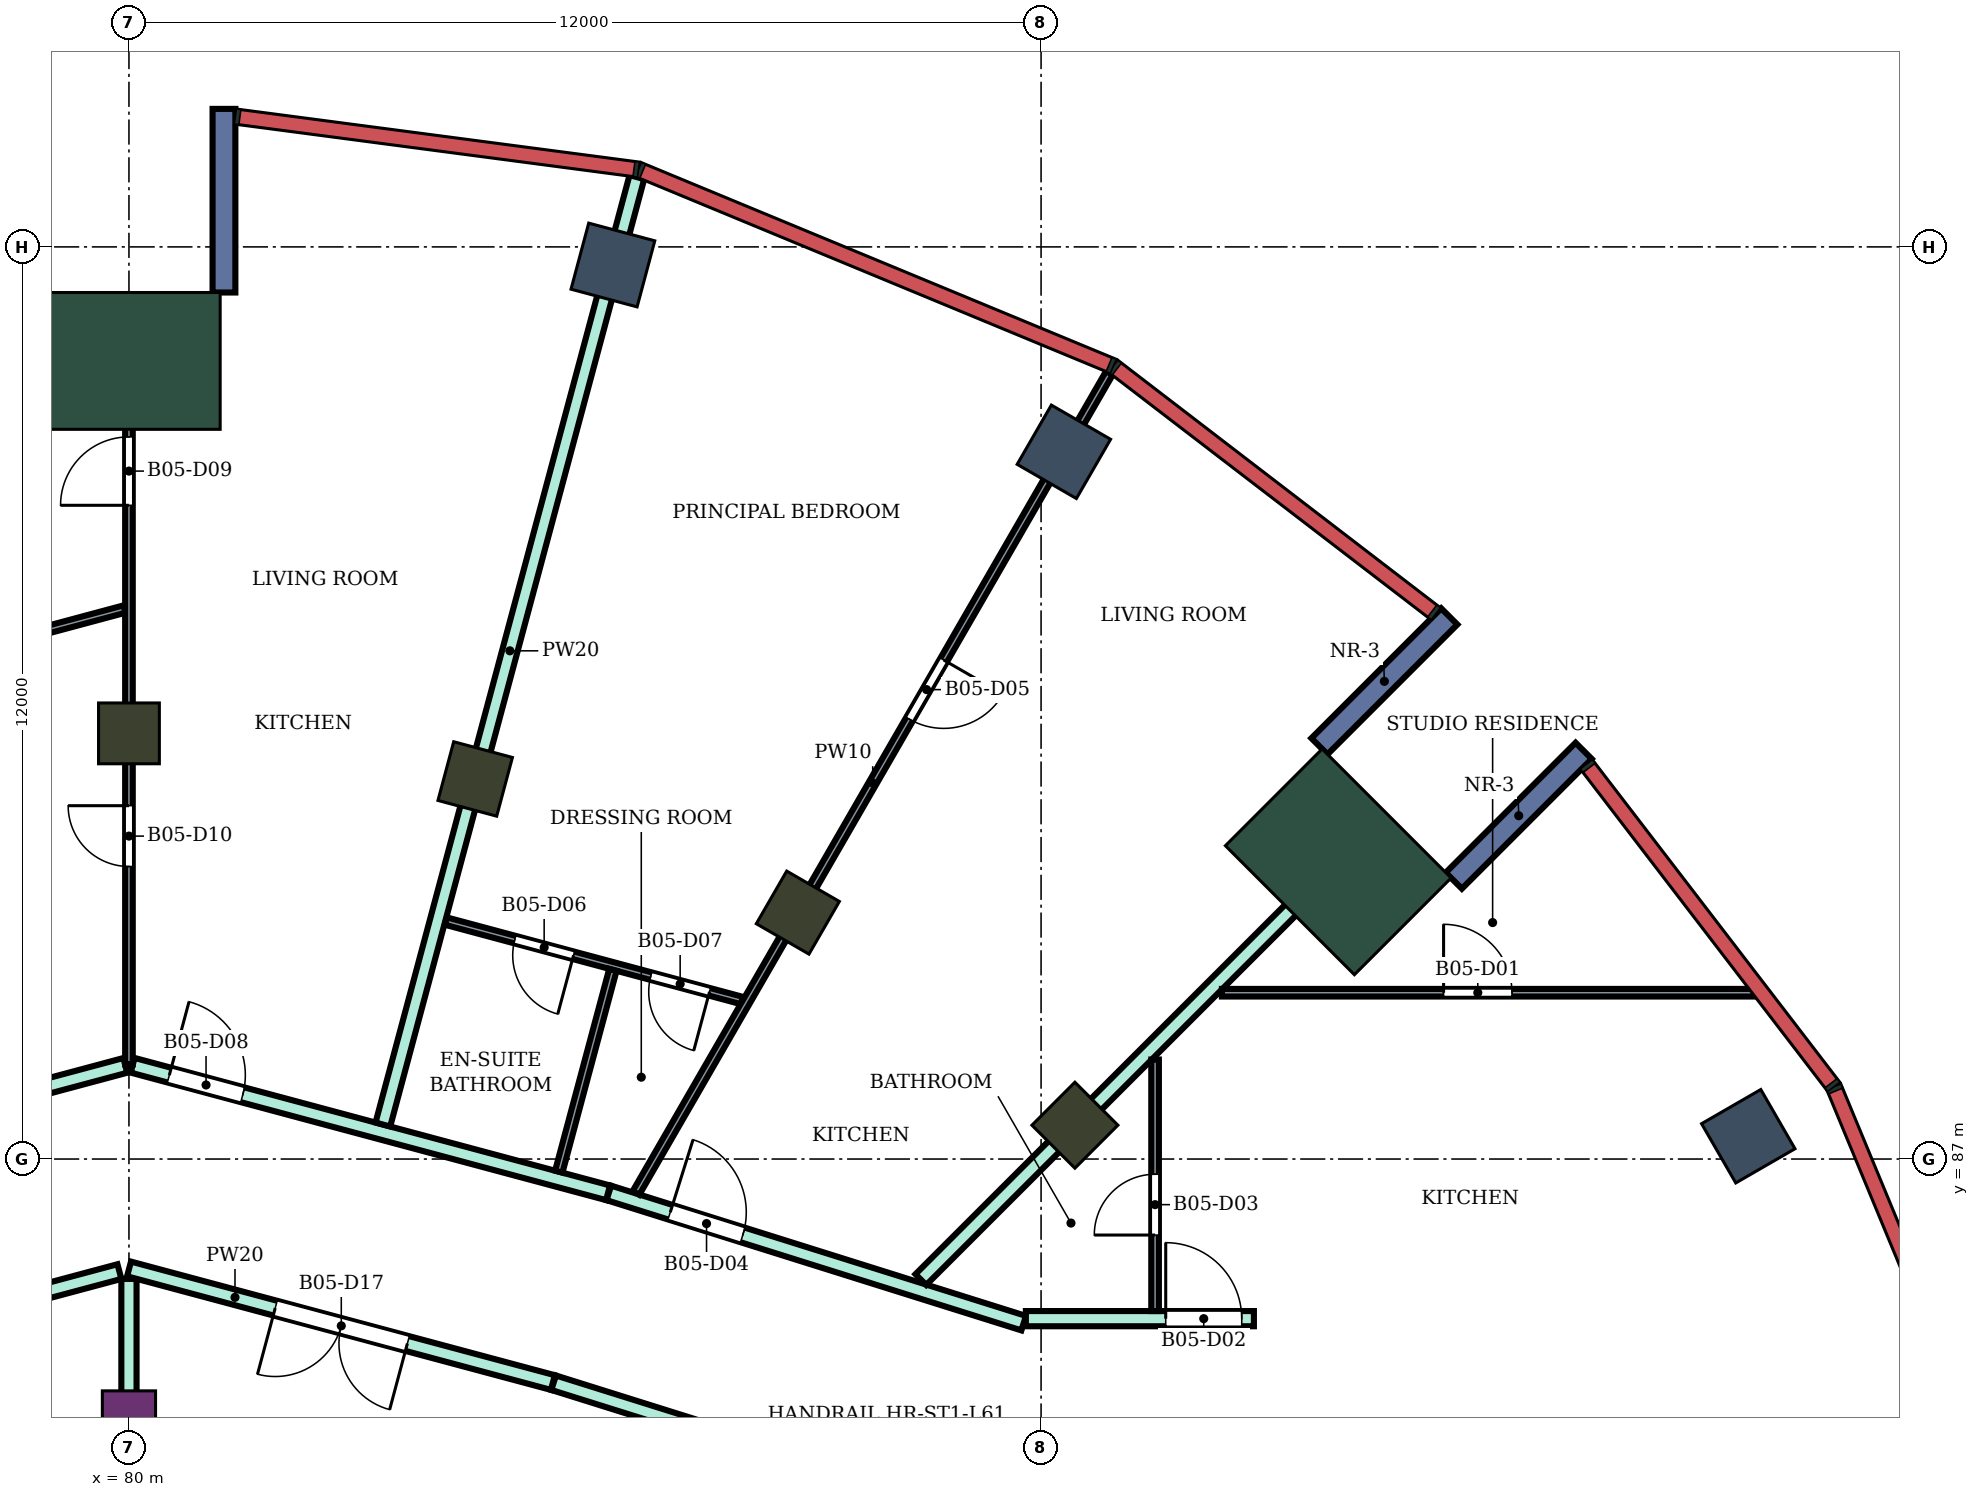
"""IFC4 building model, lengths in metres.
Left out: names, types, materials, properties, quantities, classifications, styles, units other than length and angle.
Written with IfcOpenShell. Run it as: python <this file> out.ifc"""

import sys

from ifc_helpers import new_model, si_unit, direction, frame, frame_2d, origin, origin_2d, place, context, subcontext, project, spatial, rectangle, extrude, element, fill, save


model = new_model("IFC4")
c1 = context("Model", 3, precision=1e-05, world=origin(), true_north=direction((0.0, 1.0)))
c2 = subcontext(c1, "Body", "Model", "MODEL_VIEW")
j1 = project(units=[si_unit("LENGTHUNIT", "METRE"), si_unit("PLANEANGLEUNIT", "RADIAN")], contexts=[c1])
p1 = place(None, origin())
s1 = spatial("IfcSite", under=j1, at=p1, CompositionType="ELEMENT")
p2 = place(p1, origin())
s2 = spatial("IfcBuilding", under=s1, at=p2, CompositionType="ELEMENT")
p3 = place(p2, frame((0.0, 0.0, 266.7)))
s3 = spatial("IfcBuildingStorey", under=s2, at=p3, CompositionType="ELEMENT", Elevation=266.7)
for number, where, z_axis, x_axis in (
    (1, (101.304, 87.3, 0.0), (0.0, 0.0, 1.0), (0.866, 0.5, 0.0)),
    (2, (92.3, 96.304, 0.0), (0.0, 0.0, 1.0), (0.5, 0.866, 0.0)),
    (3, (86.367, 98.762, 0.0), (0.0, 0.0, 1.0), (0.259, 0.966, 0.0)),
):
    element("IfcColumn", number, at=place(p3, frame(where, z_axis=z_axis, x_axis=x_axis)), inside=s3, PredefinedType="COLUMN", context=c2, shape_type="SweptSolid", body=[
        extrude(rectangle(XDim=0.9, YDim=0.9, at=origin_2d()), origin(), (0.0, 0.0, 1.0), 4.2),
    ])
for number, where, z_axis, x_axis in (
    (4, (92.445, 87.445, 0.0), (0.0, 0.0, 1.0), (0.707, 0.707, 0.0)),
    (5, (88.8, 90.242, 0.0), (0.0, 0.0, 1.0), (0.5, 0.866, 0.0)),
    (6, (84.555, 92.0, 0.0), (0.0, 0.0, 1.0), (0.259, 0.966, 0.0)),
    (7, (80.0, 92.6, 0.0), (0.0, 0.0, 1.0), (0.0, 1.0, 0.0)),
):
    element("IfcColumn", number, at=place(p3, frame(where, z_axis=z_axis, x_axis=x_axis)), inside=s3, PredefinedType="COLUMN", context=c2, shape_type="SweptSolid", body=[
        extrude(rectangle(XDim=0.8, YDim=0.8, at=origin_2d()), origin(), (0.0, 0.0, 1.0), 4.2),
    ])
p4 = place(p3, frame((80.0, 83.6, 0.0), z_axis=(0.0, 0.0, 1.0), x_axis=(0.0, 1.0, 0.0)))
e8 = element("IfcColumn", 8, at=p4, inside=s3, PredefinedType="COLUMN", context=c2, shape_type="SweptSolid", body=[
    extrude(rectangle(XDim=0.7, YDim=0.7, at=origin_2d()), origin(), (0.0, 0.0, 1.0), 4.2),
])
for number, where, z_axis, x_axis in (
    (9, (95.91, 90.91, 0.0), (0.0, 0.0, 1.0), (0.707, 0.707, 0.0)),
    (10, (80.0, 97.5, 0.0), (0.0, 0.0, 1.0), (0.0, 1.0, 0.0)),
):
    element("IfcColumn", number, at=place(p3, frame(where, z_axis=z_axis, x_axis=x_axis)), inside=s3, PredefinedType="COLUMN", context=c2, shape_type="SweptSolid", body=[
        extrude(rectangle(XDim=1.8, YDim=2.4, at=origin_2d()), origin(), (0.0, 0.0, 1.0), 4.2),
    ])
for number, where, z_axis, x_axis in (
    (11, (97.43, 90.662, 0.0), (0.0, 0.0, 1.0), (0.707, 0.707, 0.0)),
    (12, (95.662, 92.43, 0.0), (0.0, 0.0, 1.0), (0.707, 0.707, 0.0)),
    (13, (81.25, 98.4, 0.0), (0.0, 0.0, 1.0), (0.0, 1.0, 0.0)),
):
    element("IfcWall", number, at=place(p3, frame(where, z_axis=z_axis, x_axis=x_axis)), inside=s3, PredefinedType="NOTDEFINED", context=c2, shape_type="SweptSolid", body=[
        extrude(rectangle(XDim=2.416, YDim=0.3, at=frame_2d((1.208, 0.0))), origin(), (0.0, 0.0, 1.0), 4.2),
    ])
p5 = place(p3, frame((73.687, 86.554, 0.0), z_axis=(0.0, 0.0, 1.0), x_axis=(0.965961994098, 0.258684027257, 0.0)))
e14 = element("IfcWall", 14, at=p5, inside=s3, PredefinedType="PARTITIONING", context=c2, shape_type="SweptSolid", body=[
    extrude(rectangle(XDim=6.486, YDim=0.2, at=frame_2d((3.243, 0.0))), origin(), (0.0, 0.0, 1.0), 3.75),
])
p6 = place(p3, frame((74.413, 84.057, 0.0), z_axis=(0.0, 0.0, 1.0), x_axis=(0.965972135939, 0.258646153246, 0.0)))
e15 = element("IfcWall", 15, at=p6, inside=s3, PredefinedType="PARTITIONING", context=c2, shape_type="SweptSolid", body=[
    extrude(rectangle(XDim=5.654, YDim=0.2, at=frame_2d((2.827, 0.0))), origin(), (0.0, 0.0, 1.0), 3.75),
])
p7 = place(p6, frame((2.593, 0.0, 0.0)))
e16 = element("IfcOpeningElement", 16, at=p7, cuts=e15, PredefinedType="OPENING", context=c2, shape_type="SweptSolid", body=[
    extrude(rectangle(XDim=0.9, YDim=2.1, at=frame_2d((0.45, 1.05))), frame((0.0, 0.11, 0.0), z_axis=(0.0, -1.0, 0.0), x_axis=(1.0, 0.0, 0.0)), (0.0, 0.0, 1.0), 0.22),
])
p8 = place(p3, frame((80.0, 82.7, 0.0), z_axis=(0.0, 0.0, 1.0), x_axis=(0.0, 1.0, 0.0)))
e17 = element("IfcWall", 17, at=p8, inside=s3, PredefinedType="PARTITIONING", context=c2, shape_type="SweptSolid", body=[
    extrude(rectangle(XDim=2.723, YDim=0.2, at=frame_2d((1.362, 0.0))), origin(), (0.0, 0.0, 1.0), 3.75),
])
p9 = place(p3, frame((80.048, 88.233, 0.0), z_axis=(0.0, 0.0, 1.0), x_axis=(0.965867917069, -0.259035068625, 0.0)))
e18 = element("IfcWall", 18, at=p9, inside=s3, PredefinedType="PARTITIONING", context=c2, shape_type="SweptSolid", body=[
    extrude(rectangle(XDim=6.476, YDim=0.2, at=frame_2d((3.238, 0.0))), origin(), (0.0, 0.0, 1.0), 3.75),
])
p10 = place(p9, frame((0.5, 0.0, 0.0)))
e19 = element("IfcOpeningElement", 19, at=p10, cuts=e18, PredefinedType="OPENING", context=c2, shape_type="SweptSolid", body=[
    extrude(rectangle(XDim=1.0, YDim=2.1, at=frame_2d((0.5, 1.05))), frame((0.0, 0.11, 0.0), z_axis=(0.0, -1.0, 0.0), x_axis=(1.0, 0.0, 0.0)), (0.0, 0.0, 1.0), 0.22),
])
p11 = place(p3, frame((80.001, 85.554, 0.0), z_axis=(0.0, 0.0, 1.0), x_axis=(0.965917658836, -0.258849524528, 0.0)))
e20 = element("IfcWall", 20, at=p11, inside=s3, PredefinedType="PARTITIONING", context=c2, shape_type="SweptSolid", body=[
    extrude(rectangle(XDim=5.773, YDim=0.2, at=frame_2d((2.887, 0.0))), origin(), (0.0, 0.0, 1.0), 3.75),
])
p12 = place(p11, frame((1.991, 0.0, 0.0)))
e21 = element("IfcOpeningElement", 21, at=p12, cuts=e20, PredefinedType="OPENING", context=c2, shape_type="SweptSolid", body=[
    extrude(rectangle(XDim=1.8, YDim=2.1, at=frame_2d((0.9, 1.05))), frame((0.0, 0.11, 0.0), z_axis=(0.0, -1.0, 0.0), x_axis=(1.0, 0.0, 0.0)), (0.0, 0.0, 1.0), 0.22),
])
p13 = place(p3, frame((83.341, 87.454, 0.0), z_axis=(0.0, 0.0, 1.0), x_axis=(0.258971872038, 0.965884863477, 0.0)))
e22 = element("IfcWall", 22, at=p13, inside=s3, PredefinedType="PARTITIONING", context=c2, shape_type="SweptSolid", body=[
    extrude(rectangle(XDim=12.904, YDim=0.2, at=frame_2d((6.452, 0.0))), origin(), (0.0, 0.0, 1.0), 3.75),
])
p14 = place(p3, frame((85.587, 84.057, 0.0), z_axis=(0.0, 0.0, 1.0), x_axis=(0.954210767728, -0.299135104513, 0.0)))
e23 = element("IfcWall", 23, at=p14, inside=s3, PredefinedType="PARTITIONING", context=c2, shape_type="SweptSolid", body=[
    extrude(rectangle(XDim=2.424, YDim=0.2, at=frame_2d((1.212, 0.0))), origin(), (0.0, 0.0, 1.0), 3.75),
])
p15 = place(p3, frame((86.313, 86.554, 0.0), z_axis=(0.0, 0.0, 1.0), x_axis=(0.954081217458, -0.299548043717, 0.0)))
e24 = element("IfcWall", 24, at=p15, inside=s3, PredefinedType="PARTITIONING", context=c2, shape_type="SweptSolid", body=[
    extrude(rectangle(XDim=5.721, YDim=0.2, at=frame_2d((2.86, 0.0))), origin(), (0.0, 0.0, 1.0), 3.75),
])
p16 = place(p15, frame((0.848, 0.0, 0.0)))
e25 = element("IfcOpeningElement", 25, at=p16, cuts=e24, PredefinedType="OPENING", context=c2, shape_type="SweptSolid", body=[
    extrude(rectangle(XDim=1.0, YDim=2.1, at=frame_2d((0.5, 1.05))), frame((0.0, 0.11, 0.0), z_axis=(0.0, -1.0, 0.0), x_axis=(1.0, 0.0, 0.0)), (0.0, 0.0, 1.0), 0.22),
])
p17 = place(p3, frame((90.418, 85.414, 0.0), z_axis=(0.0, 0.0, 1.0), x_axis=(0.707265310761, 0.706948216063, 0.0)))
e26 = element("IfcWall", 26, at=p17, inside=s3, PredefinedType="PARTITIONING", context=c2, shape_type="SweptSolid", body=[
    extrude(rectangle(XDim=8.469, YDim=0.2, at=frame_2d((4.235, 0.0))), origin(), (0.0, 0.0, 1.0), 3.75),
])
p18 = place(p3, frame((91.8, 84.9, 0.0), z_axis=(0.0, 0.0, 1.0), x_axis=(1.0, 0.0, 0.0)))
e27 = element("IfcWall", 27, at=p18, inside=s3, PredefinedType="PARTITIONING", context=c2, shape_type="SweptSolid", body=[
    extrude(rectangle(XDim=3.0, YDim=0.2, at=frame_2d((1.5, 0.0))), origin(), (0.0, 0.0, 1.0), 3.75),
])
p19 = place(p18, frame((1.84, 0.0, 0.0)))
e28 = element("IfcOpeningElement", 28, at=p19, cuts=e27, PredefinedType="OPENING", context=c2, shape_type="SweptSolid", body=[
    extrude(rectangle(XDim=1.0, YDim=2.1, at=frame_2d((0.5, 1.05))), frame((0.0, 0.11, 0.0), z_axis=(0.0, -1.0, 0.0), x_axis=(1.0, 0.0, 0.0)), (0.0, 0.0, 1.0), 0.22),
])
p20 = place(p3, frame((75.236, 92.973, 0.0), z_axis=(0.0, 0.0, 1.0), x_axis=(0.965831212389, 0.259171891173, 0.0)))
e29 = element("IfcWall", 29, at=p20, inside=s3, PredefinedType="PARTITIONING", context=c2, shape_type="SweptSolid", body=[
    extrude(rectangle(XDim=4.872, YDim=0.1, at=frame_2d((2.436, 0.0))), origin(), (0.0, 0.0, 1.0), 3.75),
])
p21 = place(p3, frame((80.0, 88.246, 0.0), z_axis=(0.0, 0.0, 1.0), x_axis=(0.0, 1.0, 0.0)))
e30 = element("IfcWall", 30, at=p21, inside=s3, PredefinedType="PARTITIONING", context=c2, shape_type="SweptSolid", body=[
    extrude(rectangle(XDim=9.954, YDim=0.1, at=frame_2d((4.977, 0.0))), origin(), (0.0, 0.0, 1.0), 3.75),
])
p22 = place(p21, frame((7.354, 0.0, 0.0)))
e31 = element("IfcOpeningElement", 31, at=p22, cuts=e30, PredefinedType="OPENING", context=c2, shape_type="SweptSolid", body=[
    extrude(rectangle(XDim=0.9, YDim=2.1, at=frame_2d((0.45, 1.05))), frame((0.0, 0.06, 0.0), z_axis=(0.0, -1.0, 0.0), x_axis=(1.0, 0.0, 0.0)), (0.0, 0.0, 1.0), 0.12),
])
p23 = place(p21, frame((2.603, 0.0, 0.0)))
e32 = element("IfcOpeningElement", 32, at=p23, cuts=e30, PredefinedType="OPENING", context=c2, shape_type="SweptSolid", body=[
    extrude(rectangle(XDim=0.8, YDim=2.1, at=frame_2d((0.4, 1.05))), frame((0.0, 0.06, 0.0), z_axis=(0.0, -1.0, 0.0), x_axis=(1.0, 0.0, 0.0)), (0.0, 0.0, 1.0), 0.12),
])
p24 = place(p3, frame((84.168, 90.131, 0.0), z_axis=(0.0, 0.0, 1.0), x_axis=(0.965828063097, -0.259183627055, 0.0)))
e33 = element("IfcWall", 33, at=p24, inside=s3, PredefinedType="PARTITIONING", context=c2, shape_type="SweptSolid", body=[
    extrude(rectangle(XDim=4.035, YDim=0.1, at=frame_2d((2.018, 0.0))), origin(), (0.0, 0.0, 1.0), 3.75),
])
p25 = place(p24, frame((0.94, 0.0, 0.0)))
e34 = element("IfcOpeningElement", 34, at=p25, cuts=e33, PredefinedType="OPENING", context=c2, shape_type="SweptSolid", body=[
    extrude(rectangle(XDim=0.8, YDim=2.1, at=frame_2d((0.4, 1.05))), frame((0.0, 0.06, 0.0), z_axis=(0.0, -1.0, 0.0), x_axis=(1.0, 0.0, 0.0)), (0.0, 0.0, 1.0), 0.12),
])
p26 = place(p24, frame((2.792, 0.0, 0.0)))
e35 = element("IfcOpeningElement", 35, at=p26, cuts=e33, PredefinedType="OPENING", context=c2, shape_type="SweptSolid", body=[
    extrude(rectangle(XDim=0.8, YDim=2.1, at=frame_2d((0.4, 1.05))), frame((0.0, 0.06, 0.0), z_axis=(0.0, -1.0, 0.0), x_axis=(1.0, 0.0, 0.0)), (0.0, 0.0, 1.0), 0.12),
])
p27 = place(p3, frame((85.655, 86.834, 0.0), z_axis=(0.0, 0.0, 1.0), x_axis=(0.259005329799, 0.965875892201, 0.0)))
e36 = element("IfcWall", 36, at=p27, inside=s3, PredefinedType="PARTITIONING", context=c2, shape_type="SweptSolid", body=[
    extrude(rectangle(XDim=2.75, YDim=0.1, at=frame_2d((1.375, 0.0))), origin(), (0.0, 0.0, 1.0), 3.75),
])
p28 = place(p3, frame((86.671, 86.554, 0.0), z_axis=(0.0, 0.0, 1.0), x_axis=(0.500005228967, 0.866022384818, 0.0)))
e37 = element("IfcWall", 37, at=p28, inside=s3, PredefinedType="PARTITIONING", context=c2, shape_type="SweptSolid", body=[
    extrude(rectangle(XDim=12.456, YDim=0.1, at=frame_2d((6.228, 0.0))), origin(), (0.0, 0.0, 1.0), 3.75),
])
p29 = place(p28, frame((7.196, 0.0, 0.0)))
e38 = element("IfcOpeningElement", 38, at=p29, cuts=e37, PredefinedType="OPENING", context=c2, shape_type="SweptSolid", body=[
    extrude(rectangle(XDim=0.9, YDim=2.1, at=frame_2d((0.45, 1.05))), frame((0.0, 0.06, 0.0), z_axis=(0.0, -1.0, 0.0), x_axis=(1.0, 0.0, 0.0)), (0.0, 0.0, 1.0), 0.12),
])
p30 = place(p3, frame((93.5, 85.0, 0.0), z_axis=(0.0, 0.0, 1.0), x_axis=(0.0, 1.0, 0.0)))
e39 = element("IfcWall", 39, at=p30, inside=s3, PredefinedType="PARTITIONING", context=c2, shape_type="SweptSolid", body=[
    extrude(rectangle(XDim=3.309, YDim=0.1, at=frame_2d((1.655, 0.0))), origin(), (0.0, 0.0, 1.0), 3.75),
])
p31 = place(p30, frame((1.0, 0.0, 0.0)))
e40 = element("IfcOpeningElement", 40, at=p31, cuts=e39, PredefinedType="OPENING", context=c2, shape_type="SweptSolid", body=[
    extrude(rectangle(XDim=0.8, YDim=2.1, at=frame_2d((0.4, 1.05))), frame((0.0, 0.06, 0.0), z_axis=(0.0, -1.0, 0.0), x_axis=(1.0, 0.0, 0.0)), (0.0, 0.0, 1.0), 0.12),
])
p32 = place(p3, frame((94.379, 89.188, 0.0), z_axis=(0.0, 0.0, 1.0), x_axis=(1.0, 0.0, 0.0)))
e41 = element("IfcWall", 41, at=p32, inside=s3, PredefinedType="PARTITIONING", context=c2, shape_type="SweptSolid", body=[
    extrude(rectangle(XDim=7.021, YDim=0.1, at=frame_2d((3.51, 0.0))), origin(), (0.0, 0.0, 1.0), 3.75),
])
p33 = place(p32, frame((2.917, 0.0, 0.0)))
e42 = element("IfcOpeningElement", 42, at=p33, cuts=e41, PredefinedType="OPENING", context=c2, shape_type="SweptSolid", body=[
    extrude(rectangle(XDim=0.9, YDim=2.1, at=frame_2d((0.45, 1.05))), frame((0.0, 0.06, 0.0), z_axis=(0.0, -1.0, 0.0), x_axis=(1.0, 0.0, 0.0)), (0.0, 0.0, 1.0), 0.12),
])
p34 = place(p33, origin())
e43 = element("IfcDoor", 43, at=p34, inside=s3, OperationType="SINGLE_SWING_LEFT", PredefinedType="DOOR", context=c2, shape_type="SweptSolid", body=[
    extrude(rectangle(XDim=0.9, YDim=2.1, at=frame_2d((0.45, 1.05))), frame((0.0, 0.025, 0.0), z_axis=(0.0, -1.0, 0.0), x_axis=(1.0, 0.0, 0.0)), (0.0, 0.0, 1.0), 0.05),
])
fill(e42, e43)
p35 = place(p19, origin())
e44 = element("IfcDoor", 44, at=p35, inside=s3, OperationType="SINGLE_SWING_LEFT", PredefinedType="DOOR", context=c2, shape_type="SweptSolid", body=[
    extrude(rectangle(XDim=1.0, YDim=2.1, at=frame_2d((0.5, 1.05))), frame((0.0, 0.025, 0.0), z_axis=(0.0, -1.0, 0.0), x_axis=(1.0, 0.0, 0.0)), (0.0, 0.0, 1.0), 0.05),
])
fill(e28, e44)
p36 = place(p31, origin())
e45 = element("IfcDoor", 45, at=p36, inside=s3, OperationType="SINGLE_SWING_LEFT", PredefinedType="DOOR", context=c2, shape_type="SweptSolid", body=[
    extrude(rectangle(XDim=0.8, YDim=2.1, at=frame_2d((0.4, 1.05))), frame((0.0, 0.025, 0.0), z_axis=(0.0, -1.0, 0.0), x_axis=(1.0, 0.0, 0.0)), (0.0, 0.0, 1.0), 0.05),
])
fill(e40, e45)
p37 = place(p16, origin())
e46 = element("IfcDoor", 46, at=p37, inside=s3, OperationType="SINGLE_SWING_LEFT", PredefinedType="DOOR", context=c2, shape_type="SweptSolid", body=[
    extrude(rectangle(XDim=1.0, YDim=2.1, at=frame_2d((0.5, 1.05))), frame((0.0, 0.025, 0.0), z_axis=(0.0, -1.0, 0.0), x_axis=(1.0, 0.0, 0.0)), (0.0, 0.0, 1.0), 0.05),
])
fill(e25, e46)
p38 = place(p29, frame((0.9, 0.0, 0.0), z_axis=(0.0, 0.0, 1.0), x_axis=(-1.0, 0.0, 0.0)))
e47 = element("IfcDoor", 47, at=p38, inside=s3, OperationType="SINGLE_SWING_LEFT", PredefinedType="DOOR", context=c2, shape_type="SweptSolid", body=[
    extrude(rectangle(XDim=0.9, YDim=2.1, at=frame_2d((0.45, 1.05))), frame((0.0, 0.025, 0.0), z_axis=(0.0, -1.0, 0.0), x_axis=(1.0, 0.0, 0.0)), (0.0, 0.0, 1.0), 0.05),
])
fill(e38, e47)
p39 = place(p25, frame((0.8, 0.0, 0.0), z_axis=(0.0, 0.0, 1.0), x_axis=(-1.0, 0.0, 0.0)))
e48 = element("IfcDoor", 48, at=p39, inside=s3, OperationType="SINGLE_SWING_LEFT", PredefinedType="DOOR", context=c2, shape_type="SweptSolid", body=[
    extrude(rectangle(XDim=0.8, YDim=2.1, at=frame_2d((0.4, 1.05))), frame((0.0, 0.025, 0.0), z_axis=(0.0, -1.0, 0.0), x_axis=(1.0, 0.0, 0.0)), (0.0, 0.0, 1.0), 0.05),
])
fill(e34, e48)
p40 = place(p26, frame((0.8, 0.0, 0.0), z_axis=(0.0, 0.0, 1.0), x_axis=(-1.0, 0.0, 0.0)))
e49 = element("IfcDoor", 49, at=p40, inside=s3, OperationType="SINGLE_SWING_LEFT", PredefinedType="DOOR", context=c2, shape_type="SweptSolid", body=[
    extrude(rectangle(XDim=0.8, YDim=2.1, at=frame_2d((0.4, 1.05))), frame((0.0, 0.025, 0.0), z_axis=(0.0, -1.0, 0.0), x_axis=(1.0, 0.0, 0.0)), (0.0, 0.0, 1.0), 0.05),
])
fill(e35, e49)
p41 = place(p10, origin())
e50 = element("IfcDoor", 50, at=p41, inside=s3, OperationType="SINGLE_SWING_LEFT", PredefinedType="DOOR", context=c2, shape_type="SweptSolid", body=[
    extrude(rectangle(XDim=1.0, YDim=2.1, at=frame_2d((0.5, 1.05))), frame((0.0, 0.025, 0.0), z_axis=(0.0, -1.0, 0.0), x_axis=(1.0, 0.0, 0.0)), (0.0, 0.0, 1.0), 0.05),
])
fill(e19, e50)
p42 = place(p22, origin())
e51 = element("IfcDoor", 51, at=p42, inside=s3, OperationType="SINGLE_SWING_LEFT", PredefinedType="DOOR", context=c2, shape_type="SweptSolid", body=[
    extrude(rectangle(XDim=0.9, YDim=2.1, at=frame_2d((0.45, 1.05))), frame((0.0, 0.025, 0.0), z_axis=(0.0, -1.0, 0.0), x_axis=(1.0, 0.0, 0.0)), (0.0, 0.0, 1.0), 0.05),
])
fill(e31, e51)
p43 = place(p23, origin())
e52 = element("IfcDoor", 52, at=p43, inside=s3, OperationType="SINGLE_SWING_RIGHT", PredefinedType="DOOR", context=c2, shape_type="SweptSolid", body=[
    extrude(rectangle(XDim=0.8, YDim=2.1, at=frame_2d((0.4, 1.05))), frame((0.0, 0.025, 0.0), z_axis=(0.0, -1.0, 0.0), x_axis=(1.0, 0.0, 0.0)), (0.0, 0.0, 1.0), 0.05),
])
fill(e32, e52)
p44 = place(p12, frame((1.8, 0.0, 0.0), z_axis=(0.0, 0.0, 1.0), x_axis=(-1.0, 0.0, 0.0)))
e53 = element("IfcDoor", 53, at=p44, inside=s3, OperationType="DOUBLE_DOOR_SINGLE_SWING", PredefinedType="DOOR", context=c2, shape_type="SweptSolid", body=[
    extrude(rectangle(XDim=1.8, YDim=2.1, at=frame_2d((0.9, 1.05))), frame((0.0, 0.025, 0.0), z_axis=(0.0, -1.0, 0.0), x_axis=(1.0, 0.0, 0.0)), (0.0, 0.0, 1.0), 0.05),
])
fill(e21, e53)
save(model, sys.argv[1])
